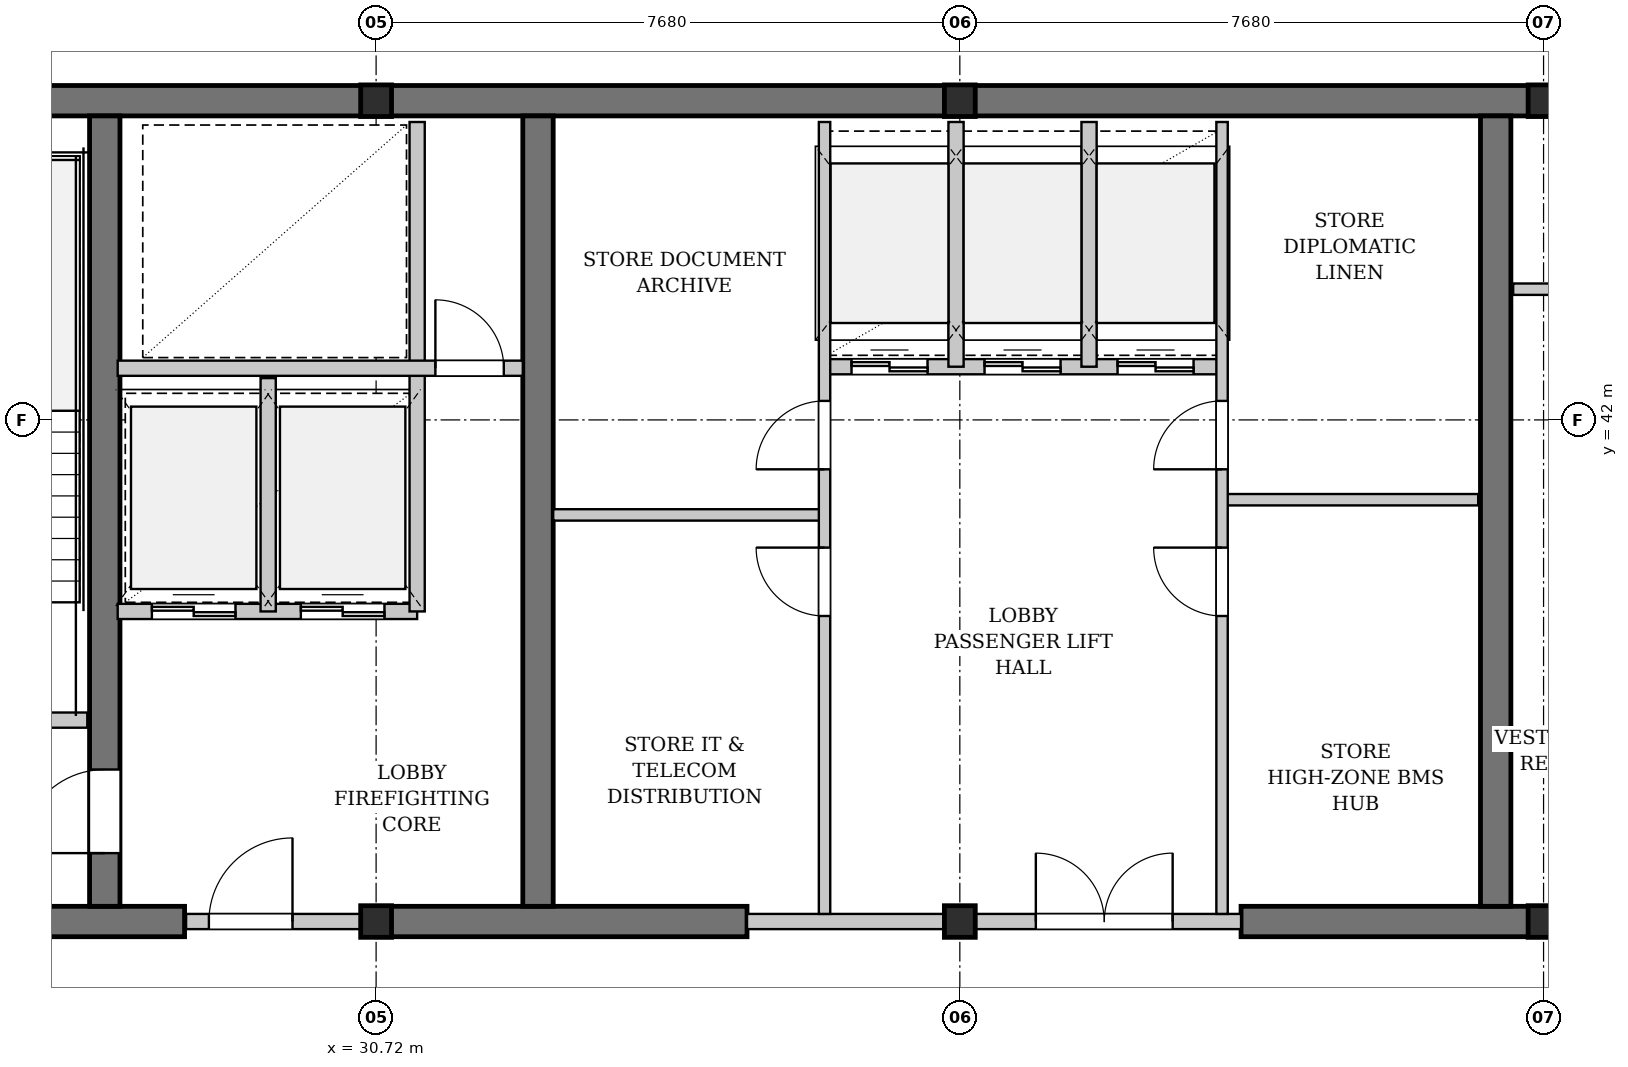
"""IFC4 building model, lengths in metres.
Left out: names, types, materials, properties, quantities, classifications, styles, units other than length and angle.
Written with IfcOpenShell. Run it as: python <this file> out.ifc"""

import sys

from ifc_helpers import new_model, si_unit, direction, frame, frame_2d, origin, origin_2d, place, context, subcontext, project, spatial, rectangle, i_section, extrude, element, fill, save


model = new_model("IFC4")
c1 = context("Model", 3, precision=1e-05, world=origin(), true_north=direction((0.0, 1.0)))
c2 = subcontext(c1, "Body", "Model", "MODEL_VIEW")
j1 = project(units=[si_unit("LENGTHUNIT", "METRE"), si_unit("PLANEANGLEUNIT", "RADIAN")], contexts=[c1])
p1 = place(None, origin())
s1 = spatial("IfcSite", under=j1, at=p1, CompositionType="ELEMENT")
p2 = place(p1, origin())
s2 = spatial("IfcBuilding", under=s1, at=p2, CompositionType="ELEMENT")
p3 = place(p2, frame((0.0, 0.0, 276.1)))
s3 = spatial("IfcBuildingStorey", under=s2, at=p3, CompositionType="ELEMENT", Elevation=276.1)
p4 = place(p3, frame((22.84, 46.2, 0.0), z_axis=(0.0, 0.0, 1.0), x_axis=(1.0, 0.0, 0.0)))
e1 = element("IfcWall", 1, at=p4, inside=s3, PredefinedType="SHEAR", context=c2, shape_type="SweptSolid", body=[
    extrude(rectangle(XDim=31.12, YDim=0.4, at=frame_2d((15.56, 0.0))), origin(), (0.0, 0.0, 1.0), 3.18),
])
p5 = place(p3, frame((22.84, 35.4, 0.0), z_axis=(0.0, 0.0, 1.0), x_axis=(1.0, 0.0, 0.0)))
e2 = element("IfcWall", 2, at=p5, inside=s3, PredefinedType="SHEAR", context=c2, shape_type="SweptSolid", body=[
    extrude(rectangle(XDim=5.36, YDim=0.4, at=frame_2d((2.68, 0.0))), origin(), (0.0, 0.0, 1.0), 3.18),
])
p6 = place(p3, frame((30.72, 35.4, 0.0), z_axis=(0.0, 0.0, 1.0), x_axis=(1.0, 0.0, 0.0)))
e3 = element("IfcWall", 3, at=p6, inside=s3, PredefinedType="SHEAR", context=c2, shape_type="SweptSolid", body=[
    extrude(rectangle(XDim=4.88, YDim=0.4, at=frame_2d((2.44, 0.0))), origin(), (0.0, 0.0, 1.0), 3.18),
])
p7 = place(p3, frame((42.1, 35.4, 0.0), z_axis=(0.0, 0.0, 1.0), x_axis=(1.0, 0.0, 0.0)))
e4 = element("IfcWall", 4, at=p7, inside=s3, PredefinedType="SHEAR", context=c2, shape_type="SweptSolid", body=[
    extrude(rectangle(XDim=8.05, YDim=0.4, at=frame_2d((4.025, 0.0))), origin(), (0.0, 0.0, 1.0), 3.18),
])
p8 = place(p7, frame((4.85, 0.0, 0.0)))
e5 = element("IfcOpeningElement", 5, at=p8, cuts=e4, PredefinedType="OPENING", context=c2, shape_type="SweptSolid", body=[
    extrude(rectangle(XDim=0.9, YDim=2.15, at=frame_2d((0.45, 1.075))), frame((0.0, 0.21, 0.0), z_axis=(0.0, -1.0, 0.0), x_axis=(1.0, 0.0, 0.0)), (0.0, 0.0, 1.0), 0.42),
])
p9 = place(p3, frame((27.15, 35.6, 0.0), z_axis=(0.0, 0.0, 1.0), x_axis=(0.0, 1.0, 0.0)))
e6 = element("IfcWall", 6, at=p9, inside=s3, PredefinedType="SHEAR", context=c2, shape_type="SweptSolid", body=[
    extrude(rectangle(XDim=10.4, YDim=0.4, at=frame_2d((5.2, 0.0))), origin(), (0.0, 0.0, 1.0), 3.18),
])
p10 = place(p9, frame((0.7, 0.0, 0.0)))
e7 = element("IfcOpeningElement", 7, at=p10, cuts=e6, PredefinedType="OPENING", context=c2, shape_type="SweptSolid", body=[
    extrude(rectangle(XDim=1.1, YDim=2.15, at=frame_2d((0.55, 1.075))), frame((0.0, 0.21, 0.0), z_axis=(0.0, -1.0, 0.0), x_axis=(1.0, 0.0, 0.0)), (0.0, 0.0, 1.0), 0.42),
])
for number, where, z_axis, x_axis in (
    (8, (32.85, 35.6, 0.0), (0.0, 0.0, 1.0), (0.0, 1.0, 0.0)),
    (9, (45.45, 35.6, 0.0), (0.0, 0.0, 1.0), (0.0, 1.0, 0.0)),
):
    element("IfcWall", number, at=place(p3, frame(where, z_axis=z_axis, x_axis=x_axis)), inside=s3, PredefinedType="SHEAR", context=c2, shape_type="SweptSolid", body=[
        extrude(rectangle(XDim=10.4, YDim=0.4, at=frame_2d((5.2, 0.0))), origin(), (0.0, 0.0, 1.0), 3.18),
    ])
for number, where, z_axis, x_axis in (
    (10, (30.72, 35.4, 0.0), (0.0, 0.0, 1.0), (1.0, 0.0, 0.0)),
    (11, (30.72, 46.2, 0.0), (0.0, 0.0, 1.0), (1.0, 0.0, 0.0)),
    (12, (38.4, 35.4, 0.0), (0.0, 0.0, 1.0), (1.0, 0.0, 0.0)),
    (13, (38.4, 46.2, 0.0), (0.0, 0.0, 1.0), (1.0, 0.0, 0.0)),
    (14, (46.08, 35.4, 0.0), (0.0, 0.0, 1.0), (1.0, 0.0, 0.0)),
    (15, (46.08, 46.2, 0.0), (0.0, 0.0, 1.0), (1.0, 0.0, 0.0)),
):
    element("IfcColumn", number, at=place(p3, frame(where, z_axis=z_axis, x_axis=x_axis)), inside=s3, PredefinedType="COLUMN", context=c2, shape_type="SweptSolid", body=[
        extrude(i_section(OverallWidth=0.406, OverallDepth=0.416, WebThickness=0.03, FlangeThickness=0.048, FilletRadius=0.015, at=origin_2d()), origin(), (0.0, 0.0, 1.0), 3.4),
    ])
p11 = place(p3, frame((23.3, 38.05, 0.0), z_axis=(0.0, 0.0, 1.0), x_axis=(1.0, 0.0, 0.0)))
e16 = element("IfcWall", 16, at=p11, inside=s3, PredefinedType="PARTITIONING", context=c2, shape_type="SweptSolid", body=[
    extrude(rectangle(XDim=3.62, YDim=0.2, at=frame_2d((1.81, 0.0))), origin(), (0.0, 0.0, 1.0), 3.18),
])
p12 = place(p11, frame((1.26, 0.0, 0.0)))
e17 = element("IfcOpeningElement", 17, at=p12, cuts=e16, PredefinedType="OPENING", context=c2, shape_type="SweptSolid", body=[
    extrude(rectangle(XDim=1.1, YDim=2.15, at=frame_2d((0.55, 1.075))), frame((0.0, 0.11, 0.0), z_axis=(0.0, -1.0, 0.0), x_axis=(1.0, 0.0, 0.0)), (0.0, 0.0, 1.0), 0.22),
])
p13 = place(p3, frame((28.22, 35.4, 0.0), z_axis=(0.0, 0.0, 1.0), x_axis=(1.0, 0.0, 0.0)))
e18 = element("IfcWall", 18, at=p13, inside=s3, PredefinedType="PARTITIONING", context=c2, shape_type="SweptSolid", body=[
    extrude(rectangle(XDim=2.5, YDim=0.2, at=frame_2d((1.25, 0.0))), origin(), (0.0, 0.0, 1.0), 2.575),
])
p14 = place(p13, frame((0.3, 0.0, 0.0)))
e19 = element("IfcOpeningElement", 19, at=p14, cuts=e18, PredefinedType="OPENING", context=c2, shape_type="SweptSolid", body=[
    extrude(rectangle(XDim=1.1, YDim=2.15, at=frame_2d((0.55, 1.075))), frame((0.0, 0.11, 0.0), z_axis=(0.0, -1.0, 0.0), x_axis=(1.0, 0.0, 0.0)), (0.0, 0.0, 1.0), 0.22),
])
p15 = place(p3, frame((27.32, 39.48, 0.0), z_axis=(0.0, 0.0, 1.0), x_axis=(1.0, 0.0, 0.0)))
e20 = element("IfcWall", 20, at=p15, inside=s3, PredefinedType="PARTITIONING", context=c2, shape_type="SweptSolid", body=[
    extrude(rectangle(XDim=3.94, YDim=0.2, at=frame_2d((1.97, 0.0))), origin(), (0.0, 0.0, 1.0), 3.18),
])
p16 = place(p15, frame((0.45, 0.0, 0.0)))
e21 = element("IfcOpeningElement", 21, at=p16, cuts=e20, PredefinedType="OPENING", context=c2, shape_type="SweptSolid", body=[
    extrude(rectangle(XDim=1.1, YDim=2.2, at=frame_2d((0.55, 1.1))), frame((0.0, 0.11, 0.0), z_axis=(0.0, -1.0, 0.0), x_axis=(1.0, 0.0, 0.0)), (0.0, 0.0, 1.0), 0.22),
])
p17 = place(p15, frame((2.41, 0.0, 0.0)))
e22 = element("IfcOpeningElement", 22, at=p17, cuts=e20, PredefinedType="OPENING", context=c2, shape_type="SweptSolid", body=[
    extrude(rectangle(XDim=1.1, YDim=2.2, at=frame_2d((0.55, 1.1))), frame((0.0, 0.11, 0.0), z_axis=(0.0, -1.0, 0.0), x_axis=(1.0, 0.0, 0.0)), (0.0, 0.0, 1.0), 0.22),
])
p18 = place(p3, frame((29.3, 39.48, 0.0), z_axis=(0.0, 0.0, 1.0), x_axis=(0.0, 1.0, 0.0)))
e23 = element("IfcWall", 23, at=p18, inside=s3, PredefinedType="PARTITIONING", context=c2, shape_type="SweptSolid", body=[
    extrude(rectangle(XDim=3.07, YDim=0.2, at=frame_2d((1.535, 0.0))), origin(), (0.0, 0.0, 1.0), 3.18),
])
p19 = place(p3, frame((31.26, 39.48, 0.0), z_axis=(0.0, 0.0, 1.0), x_axis=(0.0, 1.0, 0.0)))
e24 = element("IfcWall", 24, at=p19, inside=s3, PredefinedType="PARTITIONING", context=c2, shape_type="SweptSolid", body=[
    extrude(rectangle(XDim=6.44, YDim=0.2, at=frame_2d((3.22, 0.0))), origin(), (0.0, 0.0, 1.0), 3.18),
])
p20 = place(p3, frame((27.32, 42.68, 0.0), z_axis=(0.0, 0.0, 1.0), x_axis=(1.0, 0.0, 0.0)))
e25 = element("IfcWall", 25, at=p20, inside=s3, PredefinedType="PARTITIONING", context=c2, shape_type="SweptSolid", body=[
    extrude(rectangle(XDim=5.33, YDim=0.2, at=frame_2d((2.665, 0.0))), origin(), (0.0, 0.0, 1.0), 3.18),
])
p21 = place(p20, frame((4.18, 0.0, 0.0)))
e26 = element("IfcOpeningElement", 26, at=p21, cuts=e25, PredefinedType="OPENING", context=c2, shape_type="SweptSolid", body=[
    extrude(rectangle(XDim=0.9, YDim=2.15, at=frame_2d((0.45, 1.075))), frame((0.0, 0.11, 0.0), z_axis=(0.0, -1.0, 0.0), x_axis=(1.0, 0.0, 0.0)), (0.0, 0.0, 1.0), 0.22),
])
p22 = place(p3, frame((35.6, 35.4, 0.0), z_axis=(0.0, 0.0, 1.0), x_axis=(1.0, 0.0, 0.0)))
e27 = element("IfcWall", 27, at=p22, inside=s3, PredefinedType="PARTITIONING", context=c2, shape_type="SweptSolid", body=[
    extrude(rectangle(XDim=6.5, YDim=0.2, at=frame_2d((3.25, 0.0))), origin(), (0.0, 0.0, 1.0), 2.575),
])
p23 = place(p22, frame((3.8, 0.0, 0.0)))
e28 = element("IfcOpeningElement", 28, at=p23, cuts=e27, PredefinedType="OPENING", context=c2, shape_type="SweptSolid", body=[
    extrude(rectangle(XDim=1.8, YDim=2.3, at=frame_2d((0.9, 1.15))), frame((0.0, 0.11, 0.0), z_axis=(0.0, -1.0, 0.0), x_axis=(1.0, 0.0, 0.0)), (0.0, 0.0, 1.0), 0.22),
])
p24 = place(p3, frame((36.6, 42.7, 0.0), z_axis=(0.0, 0.0, 1.0), x_axis=(1.0, 0.0, 0.0)))
e29 = element("IfcWall", 29, at=p24, inside=s3, PredefinedType="PARTITIONING", context=c2, shape_type="SweptSolid", body=[
    extrude(rectangle(XDim=5.25, YDim=0.2, at=frame_2d((2.625, 0.0))), origin(), (0.0, 0.0, 1.0), 3.18),
])
p25 = place(p24, frame((0.375, 0.0, 0.0)))
e30 = element("IfcOpeningElement", 30, at=p25, cuts=e29, PredefinedType="OPENING", context=c2, shape_type="SweptSolid", body=[
    extrude(rectangle(XDim=1.0, YDim=2.2, at=frame_2d((0.5, 1.1))), frame((0.0, 0.11, 0.0), z_axis=(0.0, -1.0, 0.0), x_axis=(1.0, 0.0, 0.0)), (0.0, 0.0, 1.0), 0.22),
])
p26 = place(p24, frame((2.125, 0.0, 0.0)))
e31 = element("IfcOpeningElement", 31, at=p26, cuts=e29, PredefinedType="OPENING", context=c2, shape_type="SweptSolid", body=[
    extrude(rectangle(XDim=1.0, YDim=2.2, at=frame_2d((0.5, 1.1))), frame((0.0, 0.11, 0.0), z_axis=(0.0, -1.0, 0.0), x_axis=(1.0, 0.0, 0.0)), (0.0, 0.0, 1.0), 0.22),
])
p27 = place(p24, frame((3.875, 0.0, 0.0)))
e32 = element("IfcOpeningElement", 32, at=p27, cuts=e29, PredefinedType="OPENING", context=c2, shape_type="SweptSolid", body=[
    extrude(rectangle(XDim=1.0, YDim=2.2, at=frame_2d((0.5, 1.1))), frame((0.0, 0.11, 0.0), z_axis=(0.0, -1.0, 0.0), x_axis=(1.0, 0.0, 0.0)), (0.0, 0.0, 1.0), 0.22),
])
p28 = place(p3, frame((38.35, 42.7, 0.0), z_axis=(0.0, 0.0, 1.0), x_axis=(0.0, 1.0, 0.0)))
e33 = element("IfcWall", 33, at=p28, inside=s3, PredefinedType="PARTITIONING", context=c2, shape_type="SweptSolid", body=[
    extrude(rectangle(XDim=3.22, YDim=0.2, at=frame_2d((1.61, 0.0))), origin(), (0.0, 0.0, 1.0), 2.575),
])
p29 = place(p3, frame((40.1, 42.7, 0.0), z_axis=(0.0, 0.0, 1.0), x_axis=(0.0, 1.0, 0.0)))
e34 = element("IfcWall", 34, at=p29, inside=s3, PredefinedType="PARTITIONING", context=c2, shape_type="SweptSolid", body=[
    extrude(rectangle(XDim=3.22, YDim=0.2, at=frame_2d((1.61, 0.0))), origin(), (0.0, 0.0, 1.0), 3.18),
])
p30 = place(p3, frame((33.05, 40.75, 0.0), z_axis=(0.0, 0.0, 1.0), x_axis=(1.0, 0.0, 0.0)))
e35 = element("IfcWall", 35, at=p30, inside=s3, PredefinedType="PARTITIONING", context=c2, shape_type="SweptSolid", body=[
    extrude(rectangle(XDim=3.57, YDim=0.15, at=frame_2d((1.785, 0.0))), origin(), (0.0, 0.0, 1.0), 3.18),
])
p31 = place(p3, frame((36.62, 35.5, 0.0), z_axis=(0.0, 0.0, 1.0), x_axis=(0.0, 1.0, 0.0)))
e36 = element("IfcWall", 36, at=p31, inside=s3, PredefinedType="PARTITIONING", context=c2, shape_type="SweptSolid", body=[
    extrude(rectangle(XDim=10.42, YDim=0.15, at=frame_2d((5.21, 0.0))), origin(), (0.0, 0.0, 1.0), 3.18),
])
p32 = place(p31, frame((3.92, 0.0, 0.0)))
e37 = element("IfcOpeningElement", 37, at=p32, cuts=e36, PredefinedType="OPENING", context=c2, shape_type="SweptSolid", body=[
    extrude(rectangle(XDim=0.9, YDim=2.15, at=frame_2d((0.45, 1.075))), frame((0.0, 0.085, 0.0), z_axis=(0.0, -1.0, 0.0), x_axis=(1.0, 0.0, 0.0)), (0.0, 0.0, 1.0), 0.17),
])
p33 = place(p31, frame((5.85, 0.0, 0.0)))
e38 = element("IfcOpeningElement", 38, at=p33, cuts=e36, PredefinedType="OPENING", context=c2, shape_type="SweptSolid", body=[
    extrude(rectangle(XDim=0.9, YDim=2.15, at=frame_2d((0.45, 1.075))), frame((0.0, 0.085, 0.0), z_axis=(0.0, -1.0, 0.0), x_axis=(1.0, 0.0, 0.0)), (0.0, 0.0, 1.0), 0.17),
])
p34 = place(p3, frame((41.85, 40.95, 0.0), z_axis=(0.0, 0.0, 1.0), x_axis=(1.0, 0.0, 0.0)))
e39 = element("IfcWall", 39, at=p34, inside=s3, PredefinedType="PARTITIONING", context=c2, shape_type="SweptSolid", body=[
    extrude(rectangle(XDim=3.37, YDim=0.15, at=frame_2d((1.685, 0.0))), origin(), (0.0, 0.0, 1.0), 3.18),
])
p35 = place(p3, frame((41.85, 35.5, 0.0), z_axis=(0.0, 0.0, 1.0), x_axis=(0.0, 1.0, 0.0)))
e40 = element("IfcWall", 40, at=p35, inside=s3, PredefinedType="PARTITIONING", context=c2, shape_type="SweptSolid", body=[
    extrude(rectangle(XDim=10.42, YDim=0.15, at=frame_2d((5.21, 0.0))), origin(), (0.0, 0.0, 1.0), 3.18),
])
p36 = place(p35, frame((3.92, 0.0, 0.0)))
e41 = element("IfcOpeningElement", 41, at=p36, cuts=e40, PredefinedType="OPENING", context=c2, shape_type="SweptSolid", body=[
    extrude(rectangle(XDim=0.9, YDim=2.15, at=frame_2d((0.45, 1.075))), frame((0.0, 0.085, 0.0), z_axis=(0.0, -1.0, 0.0), x_axis=(1.0, 0.0, 0.0)), (0.0, 0.0, 1.0), 0.17),
])
p37 = place(p35, frame((5.85, 0.0, 0.0)))
e42 = element("IfcOpeningElement", 42, at=p37, cuts=e40, PredefinedType="OPENING", context=c2, shape_type="SweptSolid", body=[
    extrude(rectangle(XDim=0.9, YDim=2.15, at=frame_2d((0.45, 1.075))), frame((0.0, 0.085, 0.0), z_axis=(0.0, -1.0, 0.0), x_axis=(1.0, 0.0, 0.0)), (0.0, 0.0, 1.0), 0.17),
])
p38 = place(p3, frame((45.68, 43.72, 0.0), z_axis=(0.0, 0.0, 1.0), x_axis=(1.0, 0.0, 0.0)))
e43 = element("IfcWall", 43, at=p38, inside=s3, PredefinedType="PARTITIONING", context=c2, shape_type="SweptSolid", body=[
    extrude(rectangle(XDim=4.5, YDim=0.15, at=frame_2d((2.25, 0.0))), origin(), (0.0, 0.0, 1.0), 3.18),
])
p39 = place(p38, frame((0.55, 0.0, 0.0)))
e44 = element("IfcOpeningElement", 44, at=p39, cuts=e43, PredefinedType="OPENING", context=c2, shape_type="SweptSolid", body=[
    extrude(rectangle(XDim=0.95, YDim=2.15, at=frame_2d((0.475, 1.075))), frame((0.0, 0.085, 0.0), z_axis=(0.0, -1.0, 0.0), x_axis=(1.0, 0.0, 0.0)), (0.0, 0.0, 1.0), 0.17),
])
p40 = place(p14, origin())
e45 = element("IfcDoor", 45, at=p40, inside=s3, OperationType="SINGLE_SWING_RIGHT", PredefinedType="DOOR", context=c2, shape_type="SweptSolid", body=[
    extrude(rectangle(XDim=1.1, YDim=2.15, at=frame_2d((0.55, 1.075))), frame((0.0, 0.025, 0.0), z_axis=(0.0, -1.0, 0.0), x_axis=(1.0, 0.0, 0.0)), (0.0, 0.0, 1.0), 0.05),
])
fill(e19, e45)
p41 = place(p16, origin())
e46 = element("IfcDoor", 46, at=p41, inside=s3, OperationType="DOUBLE_DOOR_SLIDING", PredefinedType="DOOR", context=c2, shape_type="SweptSolid", body=[
    extrude(rectangle(XDim=1.1, YDim=2.2, at=frame_2d((0.55, 1.1))), frame((0.0, 0.025, 0.0), z_axis=(0.0, -1.0, 0.0), x_axis=(1.0, 0.0, 0.0)), (0.0, 0.0, 1.0), 0.05),
])
fill(e21, e46)
p42 = place(p17, origin())
e47 = element("IfcDoor", 47, at=p42, inside=s3, OperationType="DOUBLE_DOOR_SLIDING", PredefinedType="DOOR", context=c2, shape_type="SweptSolid", body=[
    extrude(rectangle(XDim=1.1, YDim=2.2, at=frame_2d((0.55, 1.1))), frame((0.0, 0.025, 0.0), z_axis=(0.0, -1.0, 0.0), x_axis=(1.0, 0.0, 0.0)), (0.0, 0.0, 1.0), 0.05),
])
fill(e22, e47)
p43 = place(p21, origin())
e48 = element("IfcDoor", 48, at=p43, inside=s3, OperationType="SINGLE_SWING_LEFT", PredefinedType="DOOR", context=c2, shape_type="SweptSolid", body=[
    extrude(rectangle(XDim=0.9, YDim=2.15, at=frame_2d((0.45, 1.075))), frame((0.0, 0.025, 0.0), z_axis=(0.0, -1.0, 0.0), x_axis=(1.0, 0.0, 0.0)), (0.0, 0.0, 1.0), 0.05),
])
fill(e26, e48)
p44 = place(p23, origin())
e49 = element("IfcDoor", 49, at=p44, inside=s3, OperationType="DOUBLE_DOOR_SINGLE_SWING", PredefinedType="DOOR", context=c2, shape_type="SweptSolid", body=[
    extrude(rectangle(XDim=1.8, YDim=2.3, at=frame_2d((0.9, 1.15))), frame((0.0, 0.025, 0.0), z_axis=(0.0, -1.0, 0.0), x_axis=(1.0, 0.0, 0.0)), (0.0, 0.0, 1.0), 0.05),
])
fill(e28, e49)
p45 = place(p25, origin())
e50 = element("IfcDoor", 50, at=p45, inside=s3, OperationType="DOUBLE_DOOR_SLIDING", PredefinedType="DOOR", context=c2, shape_type="SweptSolid", body=[
    extrude(rectangle(XDim=1.0, YDim=2.2, at=frame_2d((0.5, 1.1))), frame((0.0, 0.025, 0.0), z_axis=(0.0, -1.0, 0.0), x_axis=(1.0, 0.0, 0.0)), (0.0, 0.0, 1.0), 0.05),
])
fill(e30, e50)
p46 = place(p26, origin())
e51 = element("IfcDoor", 51, at=p46, inside=s3, OperationType="DOUBLE_DOOR_SLIDING", PredefinedType="DOOR", context=c2, shape_type="SweptSolid", body=[
    extrude(rectangle(XDim=1.0, YDim=2.2, at=frame_2d((0.5, 1.1))), frame((0.0, 0.025, 0.0), z_axis=(0.0, -1.0, 0.0), x_axis=(1.0, 0.0, 0.0)), (0.0, 0.0, 1.0), 0.05),
])
fill(e31, e51)
p47 = place(p27, origin())
e52 = element("IfcDoor", 52, at=p47, inside=s3, OperationType="DOUBLE_DOOR_SLIDING", PredefinedType="DOOR", context=c2, shape_type="SweptSolid", body=[
    extrude(rectangle(XDim=1.0, YDim=2.2, at=frame_2d((0.5, 1.1))), frame((0.0, 0.025, 0.0), z_axis=(0.0, -1.0, 0.0), x_axis=(1.0, 0.0, 0.0)), (0.0, 0.0, 1.0), 0.05),
])
fill(e32, e52)
p48 = place(p32, origin())
e53 = element("IfcDoor", 53, at=p48, inside=s3, OperationType="SINGLE_SWING_RIGHT", PredefinedType="DOOR", context=c2, shape_type="SweptSolid", body=[
    extrude(rectangle(XDim=0.9, YDim=2.15, at=frame_2d((0.45, 1.075))), frame((0.0, 0.025, 0.0), z_axis=(0.0, -1.0, 0.0), x_axis=(1.0, 0.0, 0.0)), (0.0, 0.0, 1.0), 0.05),
])
fill(e37, e53)
p49 = place(p33, origin())
e54 = element("IfcDoor", 54, at=p49, inside=s3, OperationType="SINGLE_SWING_LEFT", PredefinedType="DOOR", context=c2, shape_type="SweptSolid", body=[
    extrude(rectangle(XDim=0.9, YDim=2.15, at=frame_2d((0.45, 1.075))), frame((0.0, 0.025, 0.0), z_axis=(0.0, -1.0, 0.0), x_axis=(1.0, 0.0, 0.0)), (0.0, 0.0, 1.0), 0.05),
])
fill(e38, e54)
p50 = place(p36, origin())
e55 = element("IfcDoor", 55, at=p50, inside=s3, OperationType="SINGLE_SWING_RIGHT", PredefinedType="DOOR", context=c2, shape_type="SweptSolid", body=[
    extrude(rectangle(XDim=0.9, YDim=2.15, at=frame_2d((0.45, 1.075))), frame((0.0, 0.025, 0.0), z_axis=(0.0, -1.0, 0.0), x_axis=(1.0, 0.0, 0.0)), (0.0, 0.0, 1.0), 0.05),
])
fill(e41, e55)
p51 = place(p37, origin())
e56 = element("IfcDoor", 56, at=p51, inside=s3, OperationType="SINGLE_SWING_LEFT", PredefinedType="DOOR", context=c2, shape_type="SweptSolid", body=[
    extrude(rectangle(XDim=0.9, YDim=2.15, at=frame_2d((0.45, 1.075))), frame((0.0, 0.025, 0.0), z_axis=(0.0, -1.0, 0.0), x_axis=(1.0, 0.0, 0.0)), (0.0, 0.0, 1.0), 0.05),
])
fill(e42, e56)
p52 = place(p10, origin())
e57 = element("IfcDoor", 57, at=p52, inside=s3, OperationType="SINGLE_SWING_LEFT", PredefinedType="DOOR", context=c2, shape_type="SweptSolid", body=[
    extrude(rectangle(XDim=1.1, YDim=2.15, at=frame_2d((0.55, 1.075))), frame((0.0, 0.025, 0.0), z_axis=(0.0, -1.0, 0.0), x_axis=(1.0, 0.0, 0.0)), (0.0, 0.0, 1.0), 0.05),
])
fill(e7, e57)
save(model, sys.argv[1])
